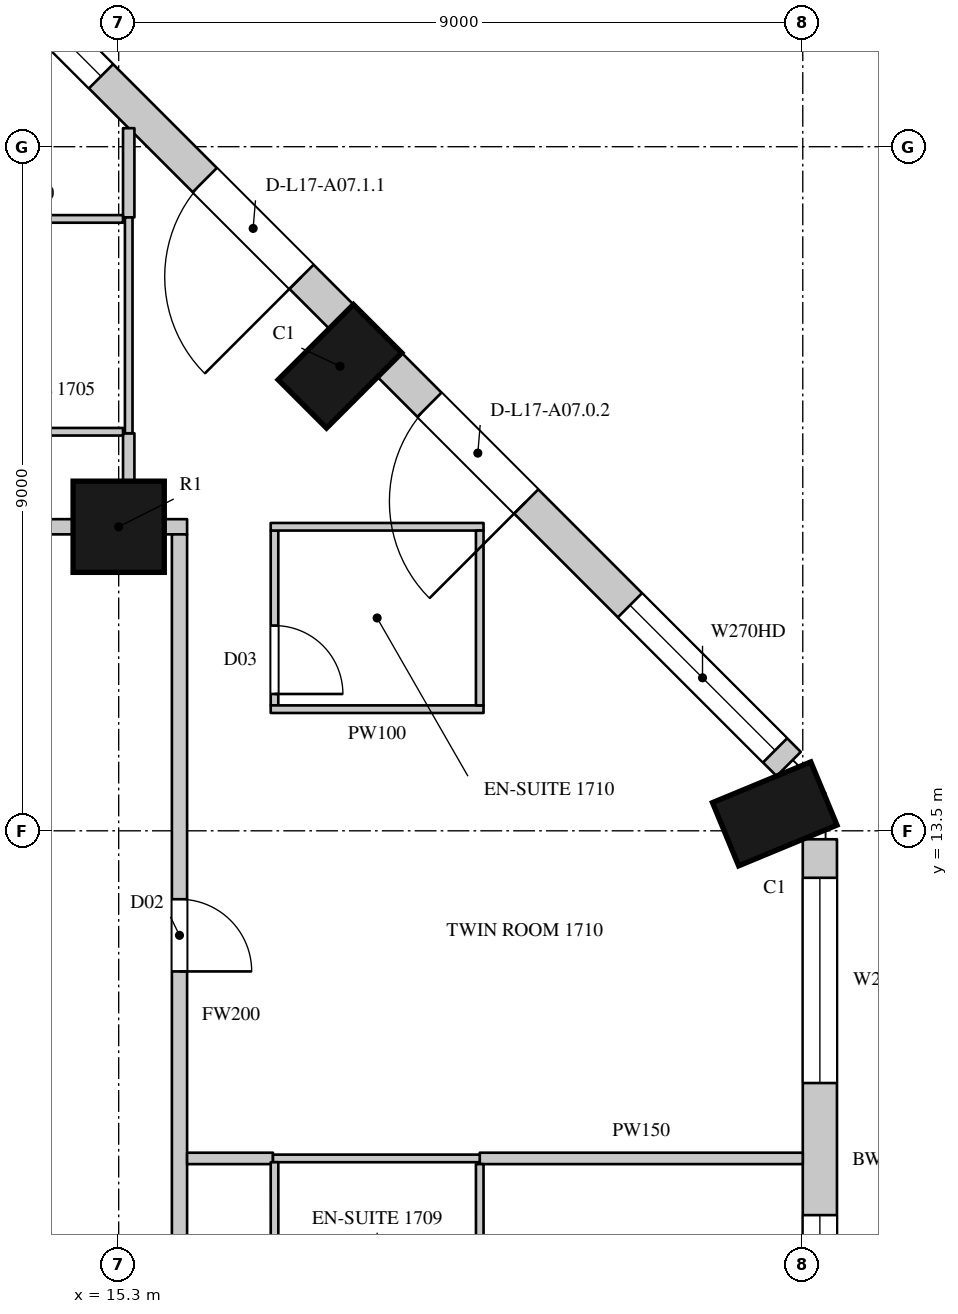
"""IFC4 building model, lengths in metres.
Left out: names, types, materials, properties, quantities, classifications, styles, units other than length and angle.
Written with IfcOpenShell. Run it as: python <this file> out.ifc"""

import sys

from ifc_helpers import new_model, si_unit, direction, frame, frame_2d, origin, origin_2d, place, context, subcontext, project, spatial, rectangle, circle, extrude, element, fill, save


model = new_model("IFC4")
c1 = context("Model", 3, precision=1e-05, world=origin(), true_north=direction((0.0, 1.0)))
c2 = subcontext(c1, "Body", "Model", "MODEL_VIEW")
j1 = project(units=[si_unit("LENGTHUNIT", "METRE"), si_unit("PLANEANGLEUNIT", "RADIAN")], contexts=[c1])
p1 = place(None, origin())
s1 = spatial("IfcSite", under=j1, at=p1, CompositionType="ELEMENT")
p2 = place(p1, origin())
s2 = spatial("IfcBuilding", under=s1, at=p2, CompositionType="ELEMENT")
p3 = place(p2, frame((0.0, 0.0, 91.5)))
s3 = spatial("IfcBuildingStorey", under=s2, at=p3, CompositionType="ELEMENT", Elevation=91.5)
for number, where, z_axis, x_axis in (
    (1, (23.931, 13.723, 0.0), (0.0, 0.0, 1.0), (-0.383, 0.924, 0.0)),
    (2, (18.211, 19.611, 0.0), (0.0, 0.0, 1.0), (-0.707, 0.707, 0.0)),
):
    element("IfcColumn", number, at=place(p3, frame(where, z_axis=z_axis, x_axis=x_axis)), inside=s3, PredefinedType="COLUMN", context=c2, shape_type="SweptSolid", body=[
        extrude(rectangle(XDim=0.9, YDim=1.4, at=origin_2d()), origin(), (0.0, 0.0, 1.0), 3.6),
    ])
p4 = place(p3, frame((15.3, 17.5, 0.0), z_axis=(0.0, 0.0, 1.0), x_axis=(1.0, 0.0, 0.0)))
e3 = element("IfcColumn", 3, at=p4, inside=s3, PredefinedType="COLUMN", context=c2, shape_type="SweptSolid", body=[
    extrude(circle(Radius=0.6, at=origin_2d()), origin(), (0.0, 0.0, 1.0), 3.6),
])
p5 = place(p3, frame((24.525, 4.95, 0.0), z_axis=(0.0, 0.0, 1.0), x_axis=(0.0, 1.0, 0.0)))
e4 = element("IfcWall", 4, at=p5, inside=s3, PredefinedType="SOLIDWALL", context=c2, shape_type="SweptSolid", body=[
    extrude(rectangle(XDim=8.439, YDim=0.45, at=frame_2d((4.219, 0.0))), origin(), (0.0, 0.0, 1.0), 3.3),
])
p6 = place(p5, frame((0.294, 0.0, 0.0)))
e5 = element("IfcOpeningElement", 5, at=p6, cuts=e4, PredefinedType="OPENING", context=c2, shape_type="SweptSolid", body=[
    extrude(rectangle(XDim=1.8, YDim=2.4, at=frame_2d((0.9, 1.2))), frame((0.0, 0.235, 0.0), z_axis=(0.0, -1.0, 0.0), x_axis=(1.0, 0.0, 0.0)), (0.0, 0.0, 1.0), 0.47),
])
p7 = place(p5, frame((2.294, 0.0, 1.05)))
e6 = element("IfcOpeningElement", 6, at=p7, cuts=e4, PredefinedType="OPENING", context=c2, shape_type="SweptSolid", body=[
    extrude(rectangle(XDim=1.2, YDim=2.0, at=frame_2d((0.6, 1.0))), frame((0.0, 0.235, 0.0), z_axis=(0.0, -1.0, 0.0), x_axis=(1.0, 0.0, 0.0)), (0.0, 0.0, 1.0), 0.47),
])
p8 = place(p5, frame((5.232, 0.0, 1.05)))
e7 = element("IfcOpeningElement", 7, at=p8, cuts=e4, PredefinedType="OPENING", context=c2, shape_type="SweptSolid", body=[
    extrude(rectangle(XDim=2.7, YDim=2.0, at=frame_2d((1.35, 1.0))), frame((0.0, 0.235, 0.0), z_axis=(0.0, -1.0, 0.0), x_axis=(1.0, 0.0, 0.0)), (0.0, 0.0, 1.0), 0.47),
])
p9 = place(p3, frame((24.115, 14.379, 0.0), z_axis=(0.0, 0.0, 1.0), x_axis=(-0.707106781187, 0.707106781187, 0.0)))
e8 = element("IfcWall", 8, at=p9, inside=s3, PredefinedType="SOLIDWALL", context=c2, shape_type="SweptSolid", body=[
    extrude(rectangle(XDim=7.424, YDim=0.45, at=frame_2d((3.712, 0.0))), origin(), (0.0, 0.0, 1.0), 3.3),
])
p10 = place(p9, frame((0.253, 0.0, 1.05)))
e9 = element("IfcOpeningElement", 9, at=p10, cuts=e8, PredefinedType="OPENING", context=c2, shape_type="SweptSolid", body=[
    extrude(rectangle(XDim=2.7, YDim=2.0, at=frame_2d((1.35, 1.0))), frame((0.0, 0.235, 0.0), z_axis=(0.0, -1.0, 0.0), x_axis=(1.0, 0.0, 0.0)), (0.0, 0.0, 1.0), 0.47),
])
p11 = place(p9, frame((4.884, 0.0, 0.0)))
e10 = element("IfcOpeningElement", 10, at=p11, cuts=e8, PredefinedType="OPENING", context=c2, shape_type="SweptSolid", body=[
    extrude(rectangle(XDim=1.8, YDim=2.4, at=frame_2d((0.9, 1.2))), frame((0.0, 0.235, 0.0), z_axis=(0.0, -1.0, 0.0), x_axis=(1.0, 0.0, 0.0)), (0.0, 0.0, 1.0), 0.47),
])
p12 = place(p3, frame((18.229, 20.265, 0.0), z_axis=(0.0, 0.0, 1.0), x_axis=(-0.707106781187, 0.707106781187, 0.0)))
e11 = element("IfcWall", 11, at=p12, inside=s3, PredefinedType="SOLIDWALL", context=c2, shape_type="SweptSolid", body=[
    extrude(rectangle(XDim=7.424, YDim=0.45, at=frame_2d((3.712, 0.0))), origin(), (0.0, 0.0, 1.0), 3.3),
])
p13 = place(p12, frame((0.74, 0.0, 0.0)))
e12 = element("IfcOpeningElement", 12, at=p13, cuts=e11, PredefinedType="OPENING", context=c2, shape_type="SweptSolid", body=[
    extrude(rectangle(XDim=1.8, YDim=2.4, at=frame_2d((0.9, 1.2))), frame((0.0, 0.235, 0.0), z_axis=(0.0, -1.0, 0.0), x_axis=(1.0, 0.0, 0.0)), (0.0, 0.0, 1.0), 0.47),
])
p14 = place(p12, frame((4.471, 0.0, 1.05)))
e13 = element("IfcOpeningElement", 13, at=p14, cuts=e11, PredefinedType="OPENING", context=c2, shape_type="SweptSolid", body=[
    extrude(rectangle(XDim=2.7, YDim=2.0, at=frame_2d((1.35, 1.0))), frame((0.0, 0.235, 0.0), z_axis=(0.0, -1.0, 0.0), x_axis=(1.0, 0.0, 0.0)), (0.0, 0.0, 1.0), 0.47),
])
p15 = place(p3, frame((23.15, 16.864, 0.0), z_axis=(0.0, 0.0, 1.0), x_axis=(-0.707106781187, 0.707106781187, 0.0)))
e14 = element("IfcWall", 14, at=p15, inside=s3, PredefinedType="SOLIDWALL", context=c2, shape_type="SweptSolid", body=[
    extrude(rectangle(XDim=1.445, YDim=0.45, at=frame_2d((0.722, 0.0))), origin(), (0.0, 0.0, 1.0), 0.6),
])
p16 = place(p3, frame((19.937, 20.078, 0.0), z_axis=(0.0, 0.0, 1.0), x_axis=(-0.707106781187, 0.707106781187, 0.0)))
e15 = element("IfcWall", 15, at=p16, inside=s3, PredefinedType="SOLIDWALL", context=c2, shape_type="SweptSolid", body=[
    extrude(rectangle(XDim=1.781, YDim=0.45, at=frame_2d((0.89, 0.0))), origin(), (0.0, 0.0, 1.0), 0.6),
])
p17 = place(p3, frame((16.486, 23.529, 0.0), z_axis=(0.0, 0.0, 1.0), x_axis=(-0.707022305137, 0.707191247145, 0.0)))
e16 = element("IfcWall", 16, at=p17, inside=s3, PredefinedType="SOLIDWALL", context=c2, shape_type="SweptSolid", body=[
    extrude(rectangle(XDim=1.445, YDim=0.45, at=frame_2d((0.723, 0.0))), origin(), (0.0, 0.0, 1.0), 0.6),
])
p18 = place(p3, frame((6.9, 17.5, 0.0), z_axis=(0.0, 0.0, 1.0), x_axis=(1.0, 0.0, 0.0)))
e17 = element("IfcWall", 17, at=p18, inside=s3, PredefinedType="PARTITIONING", context=c2, shape_type="SweptSolid", body=[
    extrude(rectangle(XDim=7.8, YDim=0.2, at=frame_2d((3.9, 0.0))), origin(), (0.0, 0.0, 1.0), 2.75),
])
p19 = place(p18, frame((1.45, 0.0, 0.0)))
e18 = element("IfcOpeningElement", 18, at=p19, cuts=e17, PredefinedType="OPENING", context=c2, shape_type="SweptSolid", body=[
    extrude(rectangle(XDim=1.1, YDim=2.4, at=frame_2d((0.55, 1.2))), frame((0.0, 0.11, 0.0), z_axis=(0.0, -1.0, 0.0), x_axis=(1.0, 0.0, 0.0)), (0.0, 0.0, 1.0), 0.22),
])
p20 = place(p3, frame((15.9, 17.5, 0.0), z_axis=(0.0, 0.0, 1.0), x_axis=(1.0, 0.0, 0.0)))
e19 = element("IfcWall", 19, at=p20, inside=s3, PredefinedType="PARTITIONING", context=c2, shape_type="SweptSolid", body=[
    extrude(rectangle(XDim=0.3, YDim=0.2, at=frame_2d((0.15, 0.0))), origin(), (0.0, 0.0, 1.0), 3.3),
])
p21 = place(p3, frame((16.1, 4.75, 0.0), z_axis=(0.0, 0.0, 1.0), x_axis=(0.0, 1.0, 0.0)))
e20 = element("IfcWall", 20, at=p21, inside=s3, PredefinedType="PARTITIONING", context=c2, shape_type="SweptSolid", body=[
    extrude(rectangle(XDim=12.65, YDim=0.2, at=frame_2d((6.325, 0.0))), origin(), (0.0, 0.0, 1.0), 3.3),
])
p22 = place(p21, frame((0.5, 0.0, 0.0)))
e21 = element("IfcOpeningElement", 21, at=p22, cuts=e20, PredefinedType="OPENING", context=c2, shape_type="SweptSolid", body=[
    extrude(rectangle(XDim=0.95, YDim=2.2, at=frame_2d((0.475, 1.1))), frame((0.0, 0.11, 0.0), z_axis=(0.0, -1.0, 0.0), x_axis=(1.0, 0.0, 0.0)), (0.0, 0.0, 1.0), 0.22),
])
p23 = place(p21, frame((6.9, 0.0, 0.0)))
e22 = element("IfcOpeningElement", 22, at=p23, cuts=e20, PredefinedType="OPENING", context=c2, shape_type="SweptSolid", body=[
    extrude(rectangle(XDim=0.95, YDim=2.2, at=frame_2d((0.475, 1.1))), frame((0.0, 0.11, 0.0), z_axis=(0.0, -1.0, 0.0), x_axis=(1.0, 0.0, 0.0)), (0.0, 0.0, 1.0), 0.22),
])
p24 = place(p3, frame((15.432, 18.094, 0.0), z_axis=(0.0, 0.0, 1.0), x_axis=(0.0, 1.0, 0.0)))
e23 = element("IfcWall", 23, at=p24, inside=s3, PredefinedType="PARTITIONING", context=c2, shape_type="SweptSolid", body=[
    extrude(rectangle(XDim=0.636, YDim=0.15, at=frame_2d((0.318, 0.0))), origin(), (0.0, 0.0, 1.0), 3.3),
])
p25 = place(p3, frame((15.432, 21.57, 0.0), z_axis=(0.0, 0.0, 1.0), x_axis=(0.0, 1.0, 0.0)))
e24 = element("IfcWall", 24, at=p25, inside=s3, PredefinedType="PARTITIONING", context=c2, shape_type="SweptSolid", body=[
    extrude(rectangle(XDim=1.174, YDim=0.15, at=frame_2d((0.587, 0.0))), origin(), (0.0, 0.0, 1.0), 3.3),
])
p26 = place(p3, frame((16.2, 9.19, 0.0), z_axis=(0.0, 0.0, 1.0), x_axis=(1.0, 0.0, 0.0)))
e25 = element("IfcWall", 25, at=p26, inside=s3, PredefinedType="PARTITIONING", context=c2, shape_type="SweptSolid", body=[
    extrude(rectangle(XDim=1.13, YDim=0.15, at=frame_2d((0.565, 0.0))), origin(), (0.0, 0.0, 1.0), 2.65),
])
p27 = place(p3, frame((20.05, 9.19, 0.0), z_axis=(0.0, 0.0, 1.0), x_axis=(1.0, 0.0, 0.0)))
e26 = element("IfcWall", 26, at=p27, inside=s3, PredefinedType="PARTITIONING", context=c2, shape_type="SweptSolid", body=[
    extrude(rectangle(XDim=4.25, YDim=0.15, at=frame_2d((2.125, 0.0))), origin(), (0.0, 0.0, 1.0), 2.65),
])
for number, where, z_axis, x_axis in (
    (27, (12.786, 18.75, 0.0), (0.0, 0.0, 1.0), (1.0, 0.0, 0.0)),
    (28, (12.786, 21.55, 0.0), (0.0, 0.0, 1.0), (1.0, 0.0, 0.0)),
):
    element("IfcWall", number, at=place(p3, frame(where, z_axis=z_axis, x_axis=x_axis)), inside=s3, PredefinedType="PARTITIONING", context=c2, shape_type="SweptSolid", body=[
        extrude(rectangle(XDim=2.571, YDim=0.1, at=frame_2d((1.286, 0.0))), origin(), (0.0, 0.0, 1.0), 3.3),
    ])
p28 = place(p3, frame((15.432, 18.73, 0.0), z_axis=(0.0, 0.0, 1.0), x_axis=(0.0, 1.0, 0.0)))
e29 = element("IfcWall", 29, at=p28, inside=s3, PredefinedType="PARTITIONING", context=c2, shape_type="SweptSolid", body=[
    extrude(rectangle(XDim=2.84, YDim=0.1, at=frame_2d((1.42, 0.0))), origin(), (0.0, 0.0, 1.0), 3.3),
])
p29 = place(p3, frame((17.33, 9.19, 0.0), z_axis=(0.0, 0.0, 1.0), x_axis=(1.0, 0.0, 0.0)))
e30 = element("IfcWall", 30, at=p29, inside=s3, PredefinedType="PARTITIONING", context=c2, shape_type="SweptSolid", body=[
    extrude(rectangle(XDim=2.72, YDim=0.1, at=frame_2d((1.36, 0.0))), origin(), (0.0, 0.0, 1.0), 2.65),
])
p30 = place(p3, frame((17.35, 9.14, 0.0), z_axis=(0.0, 0.0, 1.0), x_axis=(0.000407580973, -0.999999916939, 0.0)))
e31 = element("IfcWall", 31, at=p30, inside=s3, PredefinedType="PARTITIONING", context=c2, shape_type="SweptSolid", body=[
    extrude(rectangle(XDim=2.396, YDim=0.1, at=frame_2d((1.198, 0.0))), origin(), (0.0, 0.0, 1.0), 3.3),
])
p31 = place(p30, frame((1.25, 0.0, 0.0)))
e32 = element("IfcOpeningElement", 32, at=p31, cuts=e31, PredefinedType="OPENING", context=c2, shape_type="SweptSolid", body=[
    extrude(rectangle(XDim=0.9, YDim=2.2, at=frame_2d((0.45, 1.1))), frame((0.0, 0.06, 0.0), z_axis=(0.0, -1.0, 0.0), x_axis=(1.0, 0.0, 0.0)), (0.0, 0.0, 1.0), 0.12),
])
p32 = place(p3, frame((17.35, 15.15, 0.0), z_axis=(0.0, 0.0, 1.0), x_axis=(0.0, 1.0, 0.0)))
e33 = element("IfcWall", 33, at=p32, inside=s3, PredefinedType="PARTITIONING", context=c2, shape_type="SweptSolid", body=[
    extrude(rectangle(XDim=2.3, YDim=0.1, at=frame_2d((1.15, 0.0))), origin(), (0.0, 0.0, 1.0), 3.3),
])
p33 = place(p32, frame((0.15, 0.0, 0.0)))
e34 = element("IfcOpeningElement", 34, at=p33, cuts=e33, PredefinedType="OPENING", context=c2, shape_type="SweptSolid", body=[
    extrude(rectangle(XDim=0.9, YDim=2.2, at=frame_2d((0.45, 1.1))), frame((0.0, 0.06, 0.0), z_axis=(0.0, -1.0, 0.0), x_axis=(1.0, 0.0, 0.0)), (0.0, 0.0, 1.0), 0.12),
])
for number, where, z_axis, x_axis in (
    (35, (17.3, 15.1, 0.0), (0.0, 0.0, 1.0), (1.0, 0.0, 0.0)),
    (36, (17.3, 17.5, 0.0), (0.0, 0.0, 1.0), (1.0, 0.0, 0.0)),
):
    element("IfcWall", number, at=place(p3, frame(where, z_axis=z_axis, x_axis=x_axis)), inside=s3, PredefinedType="PARTITIONING", context=c2, shape_type="SweptSolid", body=[
        extrude(rectangle(XDim=2.8, YDim=0.1, at=frame_2d((1.4, 0.0))), origin(), (0.0, 0.0, 1.0), 3.3),
    ])
p34 = place(p3, frame((20.05, 9.115, 0.0), z_axis=(0.0, 0.0, 1.0), x_axis=(0.000430200003, -0.999999907464, 0.0)))
e37 = element("IfcWall", 37, at=p34, inside=s3, PredefinedType="PARTITIONING", context=c2, shape_type="SweptSolid", body=[
    extrude(rectangle(XDim=2.27, YDim=0.1, at=frame_2d((1.135, 0.0))), origin(), (0.0, 0.0, 1.0), 3.3),
])
p35 = place(p3, frame((20.05, 15.15, 0.0), z_axis=(0.0, 0.0, 1.0), x_axis=(0.0, 1.0, 0.0)))
e38 = element("IfcWall", 38, at=p35, inside=s3, PredefinedType="PARTITIONING", context=c2, shape_type="SweptSolid", body=[
    extrude(rectangle(XDim=2.3, YDim=0.1, at=frame_2d((1.15, 0.0))), origin(), (0.0, 0.0, 1.0), 3.3),
])
p36 = place(p7, origin())
e39 = element("IfcWindow", 39, at=p36, inside=s3, PartitioningType="SINGLE_PANEL", PredefinedType="WINDOW", context=c2, shape_type="SweptSolid", body=[
    extrude(rectangle(XDim=1.2, YDim=2.0, at=frame_2d((0.6, 1.0))), frame((0.0, 0.135, 0.0), z_axis=(0.0, -1.0, 0.0), x_axis=(1.0, 0.0, 0.0)), (0.0, 0.0, 1.0), 0.06),
])
fill(e6, e39)
p37 = place(p8, origin())
e40 = element("IfcWindow", 40, at=p37, inside=s3, PartitioningType="SINGLE_PANEL", PredefinedType="WINDOW", context=c2, shape_type="SweptSolid", body=[
    extrude(rectangle(XDim=2.7, YDim=2.0, at=frame_2d((1.35, 1.0))), frame((0.0, 0.135, 0.0), z_axis=(0.0, -1.0, 0.0), x_axis=(1.0, 0.0, 0.0)), (0.0, 0.0, 1.0), 0.06),
])
fill(e7, e40)
p38 = place(p10, origin())
e41 = element("IfcWindow", 41, at=p38, inside=s3, PartitioningType="SINGLE_PANEL", PredefinedType="WINDOW", context=c2, shape_type="SweptSolid", body=[
    extrude(rectangle(XDim=2.7, YDim=2.0, at=frame_2d((1.35, 1.0))), frame((0.0, 0.135, 0.0), z_axis=(0.0, -1.0, 0.0), x_axis=(1.0, 0.0, 0.0)), (0.0, 0.0, 1.0), 0.06),
])
fill(e9, e41)
p39 = place(p11, origin())
e42 = element("IfcDoor", 42, at=p39, inside=s3, OperationType="SLIDING_TO_LEFT", PredefinedType="DOOR", context=c2, shape_type="SweptSolid", body=[
    extrude(rectangle(XDim=1.8, YDim=2.4, at=frame_2d((0.9, 1.2))), frame((0.0, 0.13, 0.0), z_axis=(0.0, -1.0, 0.0), x_axis=(1.0, 0.0, 0.0)), (0.0, 0.0, 1.0), 0.05),
])
fill(e10, e42)
p40 = place(p13, origin())
e43 = element("IfcDoor", 43, at=p40, inside=s3, OperationType="SLIDING_TO_LEFT", PredefinedType="DOOR", context=c2, shape_type="SweptSolid", body=[
    extrude(rectangle(XDim=1.8, YDim=2.4, at=frame_2d((0.9, 1.2))), frame((0.0, 0.13, 0.0), z_axis=(0.0, -1.0, 0.0), x_axis=(1.0, 0.0, 0.0)), (0.0, 0.0, 1.0), 0.05),
])
fill(e12, e43)
p41 = place(p14, origin())
e44 = element("IfcWindow", 44, at=p41, inside=s3, PartitioningType="SINGLE_PANEL", PredefinedType="WINDOW", context=c2, shape_type="SweptSolid", body=[
    extrude(rectangle(XDim=2.7, YDim=2.0, at=frame_2d((1.35, 1.0))), frame((0.0, 0.135, 0.0), z_axis=(0.0, -1.0, 0.0), x_axis=(1.0, 0.0, 0.0)), (0.0, 0.0, 1.0), 0.06),
])
fill(e13, e44)
p42 = place(p23, origin())
e45 = element("IfcDoor", 45, at=p42, inside=s3, OperationType="SINGLE_SWING_RIGHT", PredefinedType="DOOR", context=c2, shape_type="SweptSolid", body=[
    extrude(rectangle(XDim=0.95, YDim=2.2, at=frame_2d((0.475, 1.1))), frame((0.0, 0.025, 0.0), z_axis=(0.0, -1.0, 0.0), x_axis=(1.0, 0.0, 0.0)), (0.0, 0.0, 1.0), 0.05),
])
fill(e22, e45)
p43 = place(p33, origin())
e46 = element("IfcDoor", 46, at=p43, inside=s3, OperationType="SINGLE_SWING_RIGHT", PredefinedType="DOOR", context=c2, shape_type="SweptSolid", body=[
    extrude(rectangle(XDim=0.9, YDim=2.2, at=frame_2d((0.45, 1.1))), frame((0.0, 0.025, 0.0), z_axis=(0.0, -1.0, 0.0), x_axis=(1.0, 0.0, 0.0)), (0.0, 0.0, 1.0), 0.05),
])
fill(e34, e46)
save(model, sys.argv[1])
